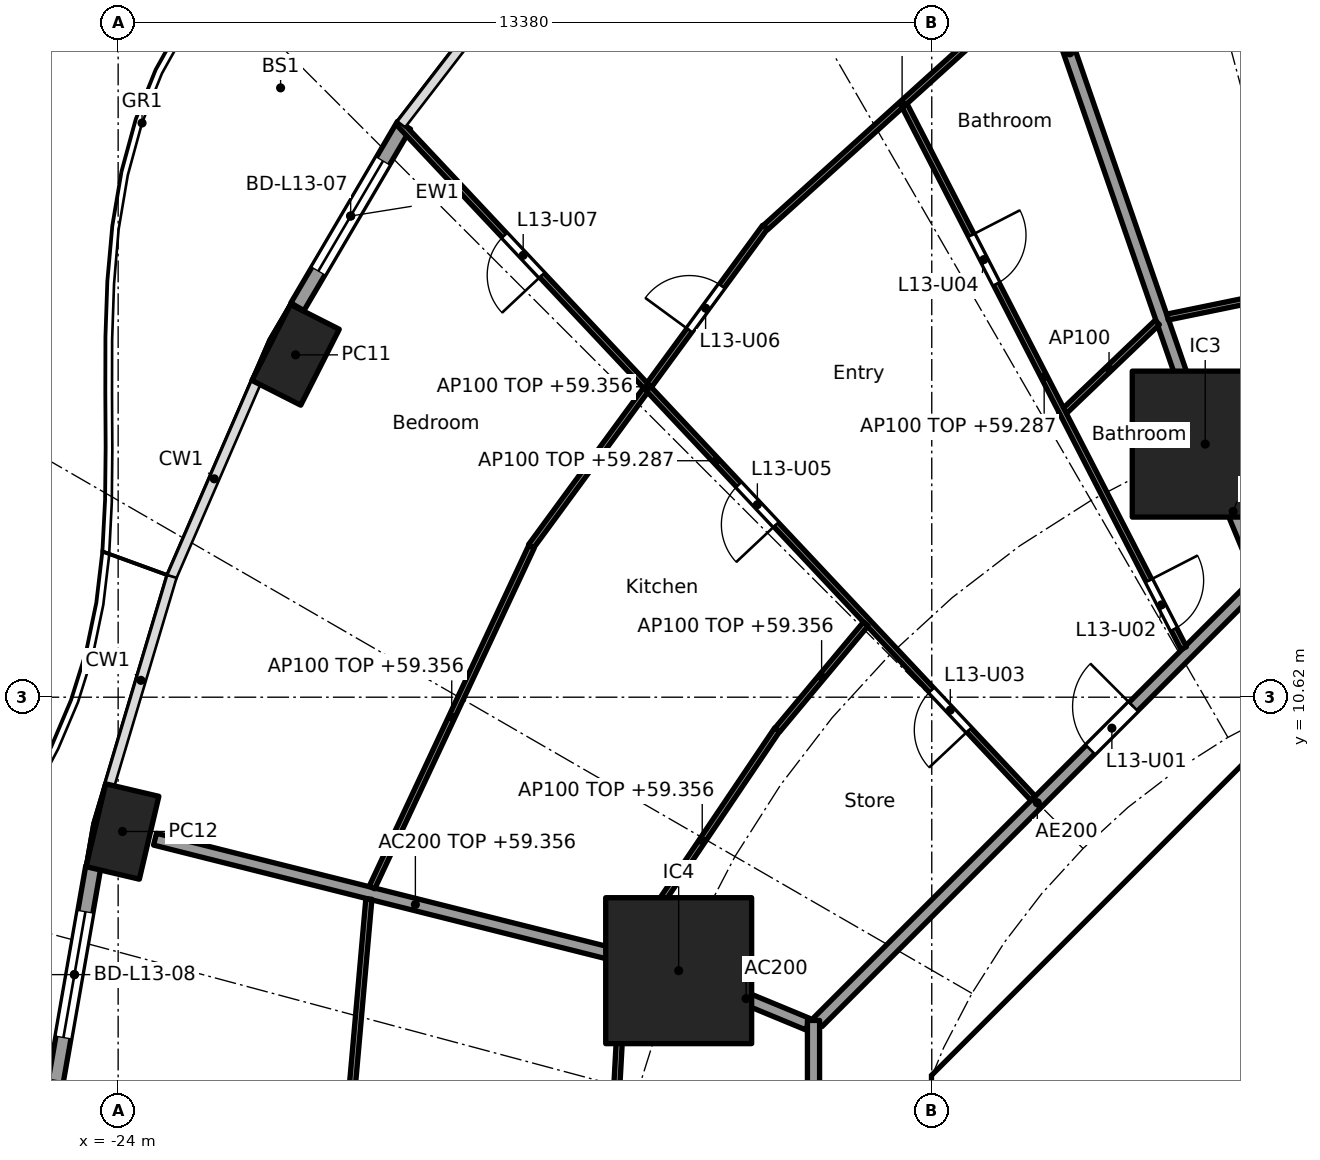
"""IFC4 building model, lengths in metres.
Left out: names, types, materials, properties, quantities, classifications, styles, units other than length and angle.
Written with IfcOpenShell. Run it as: python <this file> out.ifc"""

import sys

from ifc_helpers import new_model, si_unit, direction, frame, frame_2d, origin, origin_2d, place, context, subcontext, project, spatial, polyline, rectangle, hollow_rectangle, outline, extrude, element, fill, save


model = new_model("IFC4")
c1 = context("Model", 3, precision=1e-05, world=origin(), true_north=direction((0.0, 1.0)))
c2 = subcontext(c1, "Body", "Model", "MODEL_VIEW")
j1 = project(units=[si_unit("LENGTHUNIT", "METRE"), si_unit("PLANEANGLEUNIT", "RADIAN")], contexts=[c1])
p1 = place(None, origin())
s1 = spatial("IfcSite", under=j1, at=p1, CompositionType="ELEMENT")
p2 = place(p1, origin())
s2 = spatial("IfcBuilding", under=s1, at=p2, CompositionType="ELEMENT")
p3 = place(p2, frame((0.0, 0.0, 56.6)))
s3 = spatial("IfcBuildingStorey", under=s2, at=p3, CompositionType="ELEMENT", Elevation=56.6)
for number, where, z_axis, x_axis in (
    (1, (-21.082, 16.25, 0.0), (0.0, 0.0, 1.0), (-0.452, -0.892, 0.0)),
    (2, (-23.929, 8.412, 0.0), (0.0, 0.0, 1.0), (-0.229, -0.973, 0.0)),
):
    element("IfcColumn", number, at=place(p3, frame(where, z_axis=z_axis, x_axis=x_axis)), inside=s3, PredefinedType="COLUMN", context=c2, shape_type="SweptSolid", body=[
        extrude(hollow_rectangle(XDim=1.4, YDim=0.9, WallThickness=0.05, at=origin_2d()), origin(), (0.0, 0.0, 1.0), 3.7),
    ])
for number, where, z_axis, x_axis in (
    (3, (-6.123, 14.782, 0.0), (0.0, 0.0, 1.0), (1.0, 0.0, 0.0)),
    (4, (-14.782, 6.123, 0.0), (0.0, 0.0, 1.0), (1.0, 0.0, 0.0)),
):
    element("IfcColumn", number, at=place(p3, frame(where, z_axis=z_axis, x_axis=x_axis)), inside=s3, PredefinedType="COLUMN", context=c2, shape_type="SweptSolid", body=[
        extrude(rectangle(XDim=2.4, YDim=2.4, at=origin_2d()), origin(), (0.0, 0.0, 1.0), 3.7),
    ])
p4 = place(p3, frame((-21.052, 17.04, 0.0), z_axis=(0.0, 0.0, 1.0), x_axis=(0.506311160839, 0.862350861546, 0.0)))
e5 = element("IfcWall", 5, at=p4, inside=s3, PredefinedType="SOLIDWALL", context=c2, shape_type="SweptSolid", body=[
    extrude(rectangle(XDim=3.462, YDim=0.25, at=frame_2d((1.731, 0.0))), origin(), (0.0, 0.0, 1.0), 3.44),
])
p5 = place(p4, frame((0.681, 0.0, 0.0)))
e6 = element("IfcOpeningElement", 6, at=p5, cuts=e5, PredefinedType="OPENING", context=c2, shape_type="SweptSolid", body=[
    extrude(rectangle(XDim=2.1, YDim=2.4, at=frame_2d((1.05, 1.2))), frame((0.0, 0.135, 0.0), z_axis=(0.0, -1.0, 0.0), x_axis=(1.0, 0.0, 0.0)), (0.0, 0.0, 1.0), 0.27),
])
p6 = place(p3, frame((-25.029, 4.286, 0.0), z_axis=(0.0, 0.0, 1.0), x_axis=(0.172217377323, 0.98505897029, 0.0)))
e7 = element("IfcWall", 7, at=p6, inside=s3, PredefinedType="SOLIDWALL", context=c2, shape_type="SweptSolid", body=[
    extrude(rectangle(XDim=3.598, YDim=0.25, at=frame_2d((1.799, 0.0))), origin(), (0.0, 0.0, 1.0), 3.44),
])
p7 = place(p6, frame((0.749, 0.0, 0.0)))
e8 = element("IfcOpeningElement", 8, at=p7, cuts=e7, PredefinedType="OPENING", context=c2, shape_type="SweptSolid", body=[
    extrude(rectangle(XDim=2.1, YDim=2.4, at=frame_2d((1.05, 1.2))), frame((0.0, 0.135, 0.0), z_axis=(0.0, -1.0, 0.0), x_axis=(1.0, 0.0, 0.0)), (0.0, 0.0, 1.0), 0.27),
])
p8 = place(p3, frame((-4.613, 9.988, 0.0), z_axis=(0.0, 0.0, 1.0), x_axis=(-0.707106781187, -0.707106781187, 0.0)))
e9 = element("IfcWall", 9, at=p8, inside=s3, PredefinedType="SHEAR", context=c2, shape_type="SweptSolid", body=[
    extrude(rectangle(XDim=7.602, YDim=0.6, at=frame_2d((3.801, 0.0))), origin(), (0.0, 0.0, 1.0), 3.44),
])
p9 = place(p8, frame((0.351, 0.0, 0.0)))
e10 = element("IfcOpeningElement", 10, at=p9, cuts=e9, PredefinedType="OPENING", context=c2, shape_type="SweptSolid", body=[
    extrude(rectangle(XDim=1.1, YDim=2.1, at=frame_2d((0.55, 1.05))), frame((0.0, 0.31, 0.0), z_axis=(0.0, -1.0, 0.0), x_axis=(1.0, 0.0, 0.0)), (0.0, 0.0, 1.0), 0.62),
])
p10 = place(p3, frame((-5.8, 4.3, 0.0), z_axis=(0.0, 0.0, 1.0), x_axis=(0.0, 1.0, 0.0)))
e11 = element("IfcWall", 11, at=p10, inside=s3, PredefinedType="PARTITIONING", context=c2, shape_type="SweptSolid", body=[
    extrude(rectangle(XDim=3.927, YDim=0.15, at=frame_2d((1.963, 0.0))), origin(), (0.0, 0.0, 1.0), 3.44),
])
p11 = place(p10, frame((0.413, 0.0, 0.0)))
e12 = element("IfcOpeningElement", 12, at=p11, cuts=e11, PredefinedType="OPENING", context=c2, shape_type="SweptSolid", body=[
    extrude(rectangle(XDim=0.9, YDim=2.1, at=frame_2d((0.45, 1.05))), frame((0.0, 0.085, 0.0), z_axis=(0.0, -1.0, 0.0), x_axis=(1.0, 0.0, 0.0)), (0.0, 0.0, 1.0), 0.17),
])
p12 = place(p10, frame((2.489, 0.0, 0.0)))
e13 = element("IfcOpeningElement", 13, at=p12, cuts=e11, PredefinedType="OPENING", context=c2, shape_type="SweptSolid", body=[
    extrude(rectangle(XDim=0.9, YDim=2.1, at=frame_2d((0.45, 1.05))), frame((0.0, 0.085, 0.0), z_axis=(0.0, -1.0, 0.0), x_axis=(1.0, 0.0, 0.0)), (0.0, 0.0, 1.0), 0.17),
])
p13 = place(p3, origin())
e14 = element("IfcWall", 14, at=p13, inside=s3, PredefinedType="SHEAR", context=c2, shape_type="SweptSolid", body=[
    extrude(outline(polyline([(-10.2, 4.825), (-9.776, 4.401), (-10.025, 4.152), (-10.025, 3.801), (-10.625, 3.801), (-10.625, 4.401), (-10.2, 4.825)])), origin(), (0.0, 0.0, 1.0), 3.44),
])
p14 = place(p3, frame((-8.001, 6.1, 0.0), z_axis=(0.0, 0.0, 1.0), x_axis=(1.0, 0.0, 0.0)))
e15 = element("IfcWall", 15, at=p14, inside=s3, PredefinedType="PARTITIONING", context=c2, shape_type="SweptSolid", body=[
    extrude(rectangle(XDim=2.126, YDim=0.15, at=frame_2d((1.063, 0.0))), origin(), (0.0, 0.0, 1.0), 3.44),
])
p15 = place(p3, frame((-5.243, 12.657, 0.0), z_axis=(0.0, 0.0, 1.0), x_axis=(-0.382668627144, 0.923885664896, 0.0)))
e16 = element("IfcWall", 16, at=p15, inside=s3, PredefinedType="PARTITIONING", context=c2, shape_type="SweptSolid", body=[
    extrude(rectangle(XDim=2.2, YDim=0.2, at=frame_2d((1.1, 0.0))), origin(), (0.0, 0.0, 1.0), 3.44),
])
p16 = place(p3, frame((-6.139, 14.829, 0.0), z_axis=(0.0, 0.0, 1.0), x_axis=(-0.327178799566, 0.944962450637, 0.0)))
e17 = element("IfcWall", 17, at=p16, inside=s3, PredefinedType="PARTITIONING", context=c2, shape_type="SweptSolid", body=[
    extrude(rectangle(XDim=13.517, YDim=0.2, at=frame_2d((6.759, 0.0))), origin(), (0.0, 0.0, 1.0), 2.756),
])
p17 = place(p3, frame((-12.657, 5.243, 0.0), z_axis=(0.0, 0.0, 1.0), x_axis=(-0.923885664896, 0.382668627144, 0.0)))
e18 = element("IfcWall", 18, at=p17, inside=s3, PredefinedType="PARTITIONING", context=c2, shape_type="SweptSolid", body=[
    extrude(rectangle(XDim=2.2, YDim=0.2, at=frame_2d((1.1, 0.0))), origin(), (0.0, 0.0, 1.0), 3.44),
])
p18 = place(p3, frame((-14.831, 6.135, 0.0), z_axis=(0.0, 0.0, 1.0), x_axis=(-0.969884949569, 0.243563512454, 0.0)))
e19 = element("IfcWall", 19, at=p18, inside=s3, PredefinedType="PARTITIONING", context=c2, shape_type="SweptSolid", body=[
    extrude(rectangle(XDim=8.829, YDim=0.2, at=frame_2d((4.415, 0.0))), origin(), (0.0, 0.0, 1.0), 2.756),
])
p19 = place(p3, frame((-5.275, 12.494, 0.0), z_axis=(0.0, 0.0, 1.0), x_axis=(-0.707106781187, -0.707106781187, 0.0)))
e20 = element("IfcWall", 20, at=p19, inside=s3, PredefinedType="PARTITIONING", context=c2, shape_type="SweptSolid", body=[
    extrude(rectangle(XDim=10.209, YDim=0.2, at=frame_2d((5.104, 0.0))), origin(), (0.0, 0.0, 1.0), 3.44),
])
p20 = place(p19, frame((2.87, 0.0, 0.0)))
e21 = element("IfcOpeningElement", 21, at=p20, cuts=e20, PredefinedType="OPENING", context=c2, shape_type="SweptSolid", body=[
    extrude(rectangle(XDim=1.0, YDim=2.1, at=frame_2d((0.5, 1.05))), frame((0.0, 0.11, 0.0), z_axis=(0.0, -1.0, 0.0), x_axis=(1.0, 0.0, 0.0)), (0.0, 0.0, 1.0), 0.22),
])
p21 = place(p3, frame((-12.565, 5.304, 0.0), z_axis=(0.0, 0.0, 1.0), x_axis=(0.0, -1.0, 0.0)))
e22 = element("IfcWall", 22, at=p21, inside=s3, PredefinedType="PARTITIONING", context=c2, shape_type="SweptSolid", body=[
    extrude(rectangle(XDim=10.409, YDim=0.2, at=frame_2d((5.205, 0.0))), origin(), (0.0, 0.0, 1.0), 3.44),
])
p22 = place(p21, frame((6.106, 0.0, 0.0)))
e23 = element("IfcOpeningElement", 23, at=p22, cuts=e22, PredefinedType="OPENING", context=c2, shape_type="SweptSolid", body=[
    extrude(rectangle(XDim=1.0, YDim=2.1, at=frame_2d((0.5, 1.05))), frame((0.0, 0.11, 0.0), z_axis=(0.0, -1.0, 0.0), x_axis=(1.0, 0.0, 0.0)), (0.0, 0.0, 1.0), 0.22),
])
p23 = place(p3, frame((-2.272, 17.789, 0.0), z_axis=(0.0, 0.0, 1.0), x_axis=(-0.979595137747, -0.200981009307, 0.0)))
e24 = element("IfcWall", 24, at=p23, inside=s3, PredefinedType="PARTITIONING", context=c2, shape_type="SweptSolid", body=[
    extrude(rectangle(XDim=4.562, YDim=0.1, at=frame_2d((2.281, 0.0))), origin(), (0.0, 0.0, 1.0), 2.756),
])
p24 = place(p3, frame((-6.912, 16.782, 0.0), z_axis=(0.0, 0.0, 1.0), x_axis=(-0.722789289931, -0.691068478778, 0.0)))
e25 = element("IfcWall", 25, at=p24, inside=s3, PredefinedType="PARTITIONING", context=c2, shape_type="SweptSolid", body=[
    extrude(rectangle(XDim=2.194, YDim=0.1, at=frame_2d((1.097, 0.0))), origin(), (0.0, 0.0, 1.0), 3.44),
])
p25 = place(p3, frame((-8.861, 22.407, 0.0), z_axis=(0.0, 0.0, 1.0), x_axis=(-0.741713303551, -0.670717060567, 0.0)))
e26 = element("IfcWall", 26, at=p25, inside=s3, PredefinedType="PARTITIONING", context=c2, shape_type="SweptSolid", body=[
    extrude(rectangle(XDim=6.059, YDim=0.1, at=frame_2d((3.03, 0.0))), origin(), (0.0, 0.0, 1.0), 2.756),
])
p26 = place(p3, frame((-6.477, 11.427, 0.0), z_axis=(0.0, 0.0, 1.0), x_axis=(-0.457464037982, 0.889228122561, 0.0)))
e27 = element("IfcWall", 27, at=p26, inside=s3, PredefinedType="PARTITIONING", context=c2, shape_type="SweptSolid", body=[
    extrude(rectangle(XDim=10.032, YDim=0.1, at=frame_2d((5.016, 0.0))), origin(), (0.0, 0.0, 1.0), 2.687),
])
p27 = place(p26, frame((0.35, 0.0, 0.0)))
e28 = element("IfcOpeningElement", 28, at=p27, cuts=e27, PredefinedType="OPENING", context=c2, shape_type="SweptSolid", body=[
    extrude(rectangle(XDim=0.9, YDim=2.1, at=frame_2d((0.45, 1.05))), frame((0.0, 0.06, 0.0), z_axis=(0.0, -1.0, 0.0), x_axis=(1.0, 0.0, 0.0)), (0.0, 0.0, 1.0), 0.12),
])
p28 = place(p26, frame((6.735, 0.0, 0.0)))
e29 = element("IfcOpeningElement", 29, at=p28, cuts=e27, PredefinedType="OPENING", context=c2, shape_type="SweptSolid", body=[
    extrude(rectangle(XDim=0.9, YDim=2.1, at=frame_2d((0.45, 1.05))), frame((0.0, 0.06, 0.0), z_axis=(0.0, -1.0, 0.0), x_axis=(1.0, 0.0, 0.0)), (0.0, 0.0, 1.0), 0.12),
])
p29 = place(p3, frame((-13.362, 18.35, 0.0), z_axis=(0.0, 0.0, 1.0), x_axis=(-0.591191311491, -0.806531359104, 0.0)))
e30 = element("IfcWall", 30, at=p29, inside=s3, PredefinedType="PARTITIONING", context=c2, shape_type="SweptSolid", body=[
    extrude(rectangle(XDim=6.51, YDim=0.1, at=frame_2d((3.255, 0.0))), origin(), (0.0, 0.0, 1.0), 2.756),
])
p30 = place(p29, frame((1.202, 0.0, 0.0)))
e31 = element("IfcOpeningElement", 31, at=p30, cuts=e30, PredefinedType="OPENING", context=c2, shape_type="SweptSolid", body=[
    extrude(rectangle(XDim=0.9, YDim=2.1, at=frame_2d((0.45, 1.05))), frame((0.0, 0.06, 0.0), z_axis=(0.0, -1.0, 0.0), x_axis=(1.0, 0.0, 0.0)), (0.0, 0.0, 1.0), 0.12),
])
p31 = place(p3, frame((-8.953, 8.958, 0.0), z_axis=(0.0, 0.0, 1.0), x_axis=(-0.684574307023, 0.728943082939, 0.0)))
e32 = element("IfcWall", 32, at=p31, inside=s3, PredefinedType="PARTITIONING", context=c2, shape_type="SweptSolid", body=[
    extrude(rectangle(XDim=15.231, YDim=0.1, at=frame_2d((7.615, 0.0))), origin(), (0.0, 0.0, 1.0), 2.687),
])
p32 = place(p31, frame((1.54, 0.0, 0.0)))
e33 = element("IfcOpeningElement", 33, at=p32, cuts=e32, PredefinedType="OPENING", context=c2, shape_type="SweptSolid", body=[
    extrude(rectangle(XDim=0.9, YDim=2.1, at=frame_2d((0.45, 1.05))), frame((0.0, 0.06, 0.0), z_axis=(0.0, -1.0, 0.0), x_axis=(1.0, 0.0, 0.0)), (0.0, 0.0, 1.0), 0.12),
])
p33 = place(p31, frame((6.174, 0.0, 0.0)))
e34 = element("IfcOpeningElement", 34, at=p33, cuts=e32, PredefinedType="OPENING", context=c2, shape_type="SweptSolid", body=[
    extrude(rectangle(XDim=0.9, YDim=2.1, at=frame_2d((0.45, 1.05))), frame((0.0, 0.06, 0.0), z_axis=(0.0, -1.0, 0.0), x_axis=(1.0, 0.0, 0.0)), (0.0, 0.0, 1.0), 0.12),
])
p34 = place(p31, frame((11.8, 0.0, 0.0)))
e35 = element("IfcOpeningElement", 35, at=p34, cuts=e32, PredefinedType="OPENING", context=c2, shape_type="SweptSolid", body=[
    extrude(rectangle(XDim=0.9, YDim=2.1, at=frame_2d((0.45, 1.05))), frame((0.0, 0.06, 0.0), z_axis=(0.0, -1.0, 0.0), x_axis=(1.0, 0.0, 0.0)), (0.0, 0.0, 1.0), 0.12),
])
p35 = place(p3, frame((-11.705, 11.825, 0.0), z_axis=(0.0, 0.0, 1.0), x_axis=(-0.640861724905, -0.767656335577, 0.0)))
e36 = element("IfcWall", 36, at=p35, inside=s3, PredefinedType="PARTITIONING", context=c2, shape_type="SweptSolid", body=[
    extrude(rectangle(XDim=2.268, YDim=0.1, at=frame_2d((1.134, 0.0))), origin(), (0.0, 0.0, 1.0), 2.756),
])
p36 = place(p3, frame((-13.162, 10.087, 0.0), z_axis=(0.0, 0.0, 1.0), x_axis=(-0.55912750241, -0.829081682375, 0.0)))
e37 = element("IfcWall", 37, at=p36, inside=s3, PredefinedType="PARTITIONING", context=c2, shape_type="SweptSolid", body=[
    extrude(rectangle(XDim=4.408, YDim=0.1, at=frame_2d((2.204, 0.0))), origin(), (0.0, 0.0, 1.0), 2.756),
])
p37 = place(p3, frame((-17.203, 13.095, 0.0), z_axis=(0.0, 0.0, 1.0), x_axis=(-0.423926333401, -0.905696673202, 0.0)))
e38 = element("IfcWall", 38, at=p37, inside=s3, PredefinedType="PARTITIONING", context=c2, shape_type="SweptSolid", body=[
    extrude(rectangle(XDim=6.188, YDim=0.1, at=frame_2d((3.094, 0.0))), origin(), (0.0, 0.0, 1.0), 2.756),
])
p38 = place(p3, frame((-15.688, 6.249, 0.0), z_axis=(0.0, 0.0, 1.0), x_axis=(-0.054659814056, -0.998505034903, 0.0)))
e39 = element("IfcWall", 39, at=p38, inside=s3, PredefinedType="PARTITIONING", context=c2, shape_type="SweptSolid", body=[
    extrude(rectangle(XDim=6.208, YDim=0.1, at=frame_2d((3.104, 0.0))), origin(), (0.0, 0.0, 1.0), 2.756),
])
p39 = place(p3, frame((-19.877, 7.301, 0.0), z_axis=(0.0, 0.0, 1.0), x_axis=(-0.088143415068, -0.996107794558, 0.0)))
e40 = element("IfcWall", 40, at=p39, inside=s3, PredefinedType="PARTITIONING", context=c2, shape_type="SweptSolid", body=[
    extrude(rectangle(XDim=7.279, YDim=0.1, at=frame_2d((3.64, 0.0))), origin(), (0.0, 0.0, 1.0), 2.756),
])
p40 = place(p39, frame((3.189, 0.0, 0.0)))
e41 = element("IfcOpeningElement", 41, at=p40, cuts=e40, PredefinedType="OPENING", context=c2, shape_type="SweptSolid", body=[
    extrude(rectangle(XDim=0.9, YDim=2.1, at=frame_2d((0.45, 1.05))), frame((0.0, 0.06, 0.0), z_axis=(0.0, -1.0, 0.0), x_axis=(1.0, 0.0, 0.0)), (0.0, 0.0, 1.0), 0.12),
])
p41 = place(p5, origin())
e42 = element("IfcDoor", 42, at=p41, inside=s3, OperationType="SLIDING_TO_LEFT", PredefinedType="DOOR", context=c2, shape_type="SweptSolid", body=[
    extrude(rectangle(XDim=2.1, YDim=2.4, at=frame_2d((1.05, 1.2))), frame((0.0, 0.025, 0.0), z_axis=(0.0, -1.0, 0.0), x_axis=(1.0, 0.0, 0.0)), (0.0, 0.0, 1.0), 0.05),
])
fill(e6, e42)
p42 = place(p7, origin())
e43 = element("IfcDoor", 43, at=p42, inside=s3, OperationType="SLIDING_TO_LEFT", PredefinedType="DOOR", context=c2, shape_type="SweptSolid", body=[
    extrude(rectangle(XDim=2.1, YDim=2.4, at=frame_2d((1.05, 1.2))), frame((0.0, 0.025, 0.0), z_axis=(0.0, -1.0, 0.0), x_axis=(1.0, 0.0, 0.0)), (0.0, 0.0, 1.0), 0.05),
])
fill(e8, e43)
p43 = place(p11, origin())
e44 = element("IfcDoor", 44, at=p43, inside=s3, OperationType="SINGLE_SWING_RIGHT", PredefinedType="DOOR", context=c2, shape_type="SweptSolid", body=[
    extrude(rectangle(XDim=0.9, YDim=2.1, at=frame_2d((0.45, 1.05))), frame((0.0, 0.025, 0.0), z_axis=(0.0, -1.0, 0.0), x_axis=(1.0, 0.0, 0.0)), (0.0, 0.0, 1.0), 0.05),
])
fill(e12, e44)
p44 = place(p12, origin())
e45 = element("IfcDoor", 45, at=p44, inside=s3, OperationType="SINGLE_SWING_RIGHT", PredefinedType="DOOR", context=c2, shape_type="SweptSolid", body=[
    extrude(rectangle(XDim=0.9, YDim=2.1, at=frame_2d((0.45, 1.05))), frame((0.0, 0.025, 0.0), z_axis=(0.0, -1.0, 0.0), x_axis=(1.0, 0.0, 0.0)), (0.0, 0.0, 1.0), 0.05),
])
fill(e13, e45)
p45 = place(p9, origin())
e46 = element("IfcDoor", 46, at=p45, inside=s3, OperationType="SINGLE_SWING_LEFT", PredefinedType="DOOR", context=c2, shape_type="SweptSolid", body=[
    extrude(rectangle(XDim=1.1, YDim=2.1, at=frame_2d((0.55, 1.05))), frame((0.0, 0.025, 0.0), z_axis=(0.0, -1.0, 0.0), x_axis=(1.0, 0.0, 0.0)), (0.0, 0.0, 1.0), 0.05),
])
fill(e10, e46)
p46 = place(p20, frame((1.0, 0.0, 0.0), x_axis=(-1.0, 0.0, 0.0)))
e47 = element("IfcDoor", 47, at=p46, inside=s3, OperationType="SINGLE_SWING_RIGHT", PredefinedType="DOOR", context=c2, shape_type="SweptSolid", body=[
    extrude(rectangle(XDim=1.0, YDim=2.1, at=frame_2d((0.5, 1.05))), frame((0.0, 0.025, 0.0), z_axis=(0.0, -1.0, 0.0), x_axis=(1.0, 0.0, 0.0)), (0.0, 0.0, 1.0), 0.05),
])
fill(e21, e47)
p47 = place(p27, frame((0.9, 0.0, 0.0), x_axis=(-1.0, 0.0, 0.0)))
e48 = element("IfcDoor", 48, at=p47, inside=s3, OperationType="SINGLE_SWING_LEFT", PredefinedType="DOOR", context=c2, shape_type="SweptSolid", body=[
    extrude(rectangle(XDim=0.9, YDim=2.1, at=frame_2d((0.45, 1.05))), frame((0.0, 0.025, 0.0), z_axis=(0.0, -1.0, 0.0), x_axis=(1.0, 0.0, 0.0)), (0.0, 0.0, 1.0), 0.05),
])
fill(e28, e48)
p48 = place(p32, origin())
e49 = element("IfcDoor", 49, at=p48, inside=s3, OperationType="SINGLE_SWING_LEFT", PredefinedType="DOOR", context=c2, shape_type="SweptSolid", body=[
    extrude(rectangle(XDim=0.9, YDim=2.1, at=frame_2d((0.45, 1.05))), frame((0.0, 0.025, 0.0), z_axis=(0.0, -1.0, 0.0), x_axis=(1.0, 0.0, 0.0)), (0.0, 0.0, 1.0), 0.05),
])
fill(e33, e49)
p49 = place(p28, frame((0.9, 0.0, 0.0), x_axis=(-1.0, 0.0, 0.0)))
e50 = element("IfcDoor", 50, at=p49, inside=s3, OperationType="SINGLE_SWING_LEFT", PredefinedType="DOOR", context=c2, shape_type="SweptSolid", body=[
    extrude(rectangle(XDim=0.9, YDim=2.1, at=frame_2d((0.45, 1.05))), frame((0.0, 0.025, 0.0), z_axis=(0.0, -1.0, 0.0), x_axis=(1.0, 0.0, 0.0)), (0.0, 0.0, 1.0), 0.05),
])
fill(e29, e50)
p50 = place(p33, origin())
e51 = element("IfcDoor", 51, at=p50, inside=s3, OperationType="SINGLE_SWING_LEFT", PredefinedType="DOOR", context=c2, shape_type="SweptSolid", body=[
    extrude(rectangle(XDim=0.9, YDim=2.1, at=frame_2d((0.45, 1.05))), frame((0.0, 0.025, 0.0), z_axis=(0.0, -1.0, 0.0), x_axis=(1.0, 0.0, 0.0)), (0.0, 0.0, 1.0), 0.05),
])
fill(e34, e51)
p51 = place(p30, frame((0.9, 0.0, 0.0), x_axis=(-1.0, 0.0, 0.0)))
e52 = element("IfcDoor", 52, at=p51, inside=s3, OperationType="SINGLE_SWING_LEFT", PredefinedType="DOOR", context=c2, shape_type="SweptSolid", body=[
    extrude(rectangle(XDim=0.9, YDim=2.1, at=frame_2d((0.45, 1.05))), frame((0.0, 0.025, 0.0), z_axis=(0.0, -1.0, 0.0), x_axis=(1.0, 0.0, 0.0)), (0.0, 0.0, 1.0), 0.05),
])
fill(e31, e52)
p52 = place(p34, origin())
e53 = element("IfcDoor", 53, at=p52, inside=s3, OperationType="SINGLE_SWING_LEFT", PredefinedType="DOOR", context=c2, shape_type="SweptSolid", body=[
    extrude(rectangle(XDim=0.9, YDim=2.1, at=frame_2d((0.45, 1.05))), frame((0.0, 0.025, 0.0), z_axis=(0.0, -1.0, 0.0), x_axis=(1.0, 0.0, 0.0)), (0.0, 0.0, 1.0), 0.05),
])
fill(e35, e53)
save(model, sys.argv[1])
